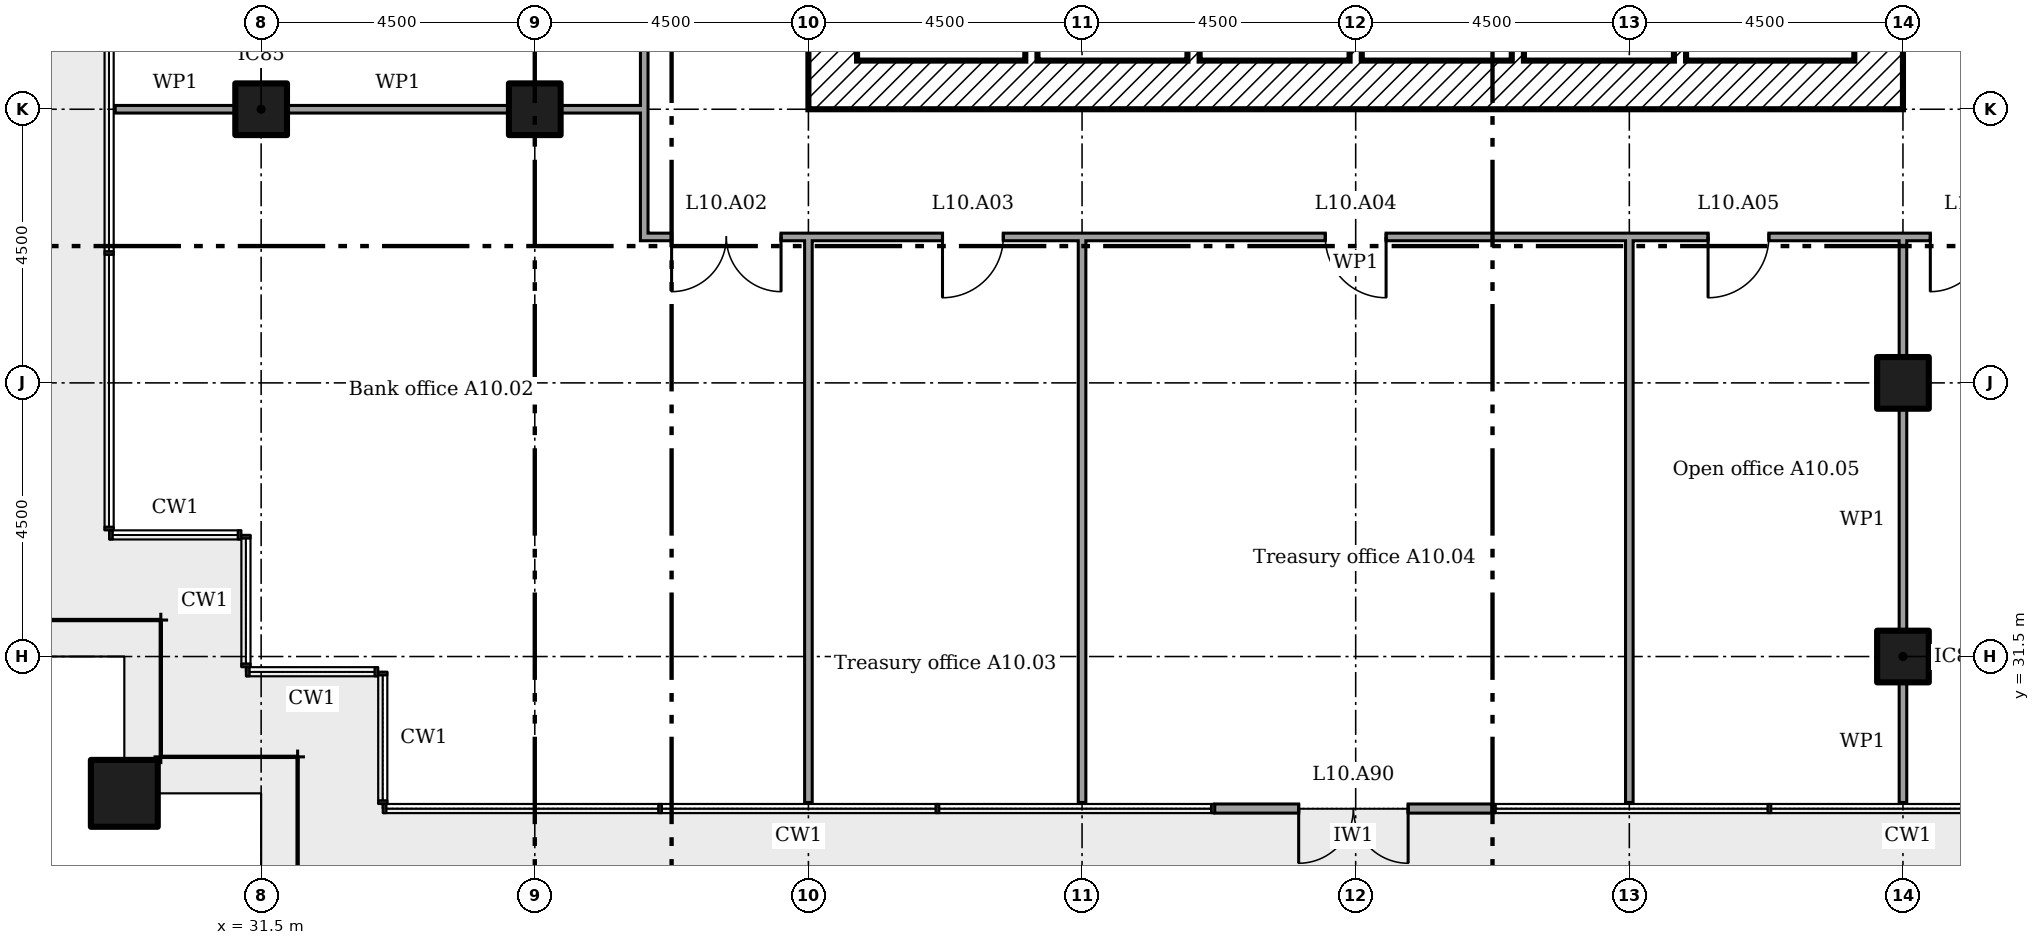
"""IFC4 building model, lengths in metres.
Left out: names, types, materials, properties, quantities, classifications, styles, units other than length and angle.
Written with IfcOpenShell. Run it as: python <this file> out.ifc"""

import sys

from ifc_helpers import new_model, si_unit, direction, frame, frame_2d, origin, origin_2d, place, context, subcontext, project, spatial, rectangle, extrude, element, fill, save


model = new_model("IFC4")
c1 = context("Model", 3, precision=1e-05, world=origin(), true_north=direction((0.0, 1.0)))
c2 = subcontext(c1, "Body", "Model", "MODEL_VIEW")
j1 = project(units=[si_unit("LENGTHUNIT", "METRE"), si_unit("PLANEANGLEUNIT", "RADIAN")], contexts=[c1])
p1 = place(None, origin())
s1 = spatial("IfcSite", under=j1, at=p1, CompositionType="ELEMENT")
p2 = place(p1, origin())
s2 = spatial("IfcBuilding", under=s1, at=p2, CompositionType="ELEMENT")
p3 = place(p2, frame((0.0, 0.0, 47.4)))
s3 = spatial("IfcBuildingStorey", under=s2, at=p3, CompositionType="ELEMENT", Elevation=47.4)
p4 = place(p3, frame((29.25, 29.25, 0.0)))
e1 = element("IfcColumn", 1, at=p4, inside=s3, PredefinedType="COLUMN", context=c2, shape_type="SweptSolid", body=[
    extrude(rectangle(XDim=1.1, YDim=1.1, at=origin_2d()), origin(), (0.0, 0.0, 1.0), 3.6),
])
for number, where in (
    (2, (31.5, 40.5, 0.0)),
    (3, (36.0, 40.5, 0.0)),
    (4, (58.5, 31.5, 0.0)),
    (5, (58.5, 36.0, 0.0)),
):
    element("IfcColumn", number, at=place(p3, frame(where)), inside=s3, PredefinedType="COLUMN", context=c2, shape_type="SweptSolid", body=[
        extrude(rectangle(XDim=0.85, YDim=0.85, at=origin_2d()), origin(), (0.0, 0.0, 1.0), 3.6),
    ])
p5 = place(p3, frame((47.182, 29.0, 0.0)))
e6 = element("IfcWall", 6, at=p5, inside=s3, PredefinedType="SOLIDWALL", context=c2, shape_type="SweptSolid", body=[
    extrude(rectangle(XDim=4.561, YDim=0.15, at=frame_2d((2.28, 0.0))), origin(), (0.0, 0.0, 1.0), 3.45),
])
p6 = place(p5, frame((1.38, 0.0, 0.0)))
e7 = element("IfcOpeningElement", 7, at=p6, cuts=e6, PredefinedType="OPENING", context=c2, shape_type="SweptSolid", body=[
    extrude(rectangle(XDim=1.8, YDim=2.4, at=frame_2d((0.9, 1.2))), frame((0.0, 0.085, 0.0), z_axis=(0.0, -1.0, 0.0), x_axis=(1.0, 0.0, 0.0)), (0.0, 0.0, 1.0), 0.17),
])
p7 = place(p3, frame((58.1, 40.5, 0.0), z_axis=(0.0, 0.0, 1.0), x_axis=(0.0, 1.0, 0.0)))
e8 = element("IfcWall", 8, at=p7, inside=s3, PredefinedType="SHEAR", context=c2, shape_type="SweptSolid", body=[
    extrude(rectangle(XDim=18.0, YDim=0.8, at=frame_2d((9.0, 0.0))), origin(), (0.0, 0.0, 1.0), 3.35),
])
p8 = place(p7, frame((13.15, 0.0, 0.0)))
e9 = element("IfcOpeningElement", 9, at=p8, cuts=e8, PredefinedType="OPENING", context=c2, shape_type="SweptSolid", body=[
    extrude(rectangle(XDim=1.2, YDim=2.1, at=frame_2d((0.6, 1.05))), frame((0.0, 0.41, 0.0), z_axis=(0.0, -1.0, 0.0), x_axis=(1.0, 0.0, 0.0)), (0.0, 0.0, 1.0), 0.82),
])
p9 = place(p7, frame((3.9, 0.0, 0.0)))
e10 = element("IfcOpeningElement", 10, at=p9, cuts=e8, PredefinedType="OPENING", context=c2, shape_type="SweptSolid", body=[
    extrude(rectangle(XDim=1.8, YDim=2.1, at=frame_2d((0.9, 1.05))), frame((0.0, 0.41, 0.0), z_axis=(0.0, -1.0, 0.0), x_axis=(1.0, 0.0, 0.0)), (0.0, 0.0, 1.0), 0.82),
])
p10 = place(p7, frame((11.525, 0.0, 0.0)))
e11 = element("IfcOpeningElement", 11, at=p10, cuts=e8, PredefinedType="OPENING", context=c2, shape_type="SweptSolid", body=[
    extrude(rectangle(XDim=1.0, YDim=2.1, at=frame_2d((0.5, 1.05))), frame((0.0, 0.41, 0.0), z_axis=(0.0, -1.0, 0.0), x_axis=(1.0, 0.0, 0.0)), (0.0, 0.0, 1.0), 0.82),
])
p11 = place(p3, frame((41.3, 40.9, 0.0)))
e12 = element("IfcWall", 12, at=p11, inside=s3, PredefinedType="SHEAR", context=c2, shape_type="SweptSolid", body=[
    extrude(rectangle(XDim=16.4, YDim=0.8, at=frame_2d((8.2, 0.0))), origin(), (0.0, 0.0, 1.0), 3.35),
])
p12 = place(p3, frame((40.9, 40.5, 0.0), z_axis=(0.0, 0.0, 1.0), x_axis=(0.0, 1.0, 0.0)))
e13 = element("IfcWall", 13, at=p12, inside=s3, PredefinedType="SHEAR", context=c2, shape_type="SweptSolid", body=[
    extrude(rectangle(XDim=18.0, YDim=0.8, at=frame_2d((9.0, 0.0))), origin(), (0.0, 0.0, 1.0), 3.35),
])
p13 = place(p12, frame((3.65, 0.0, 0.0)))
e14 = element("IfcOpeningElement", 14, at=p13, cuts=e13, PredefinedType="OPENING", context=c2, shape_type="SweptSolid", body=[
    extrude(rectangle(XDim=1.2, YDim=2.1, at=frame_2d((0.6, 1.05))), frame((0.0, 0.41, 0.0), z_axis=(0.0, -1.0, 0.0), x_axis=(1.0, 0.0, 0.0)), (0.0, 0.0, 1.0), 0.82),
])
p14 = place(p12, frame((5.475, 0.0, 0.0)))
e15 = element("IfcOpeningElement", 15, at=p14, cuts=e13, PredefinedType="OPENING", context=c2, shape_type="SweptSolid", body=[
    extrude(rectangle(XDim=1.0, YDim=2.1, at=frame_2d((0.5, 1.05))), frame((0.0, 0.41, 0.0), z_axis=(0.0, -1.0, 0.0), x_axis=(1.0, 0.0, 0.0)), (0.0, 0.0, 1.0), 0.82),
])
p15 = place(p12, frame((12.3, 0.0, 0.0)))
e16 = element("IfcOpeningElement", 16, at=p15, cuts=e13, PredefinedType="OPENING", context=c2, shape_type="SweptSolid", body=[
    extrude(rectangle(XDim=1.0, YDim=2.1, at=frame_2d((0.5, 1.05))), frame((0.0, 0.41, 0.0), z_axis=(0.0, -1.0, 0.0), x_axis=(1.0, 0.0, 0.0)), (0.0, 0.0, 1.0), 0.82),
])
for number, where, z_axis, x_axis in (
    (17, (44.167, 41.3, 0.0), (0.0, 0.0, 1.0), (0.0, 1.0, 0.0)),
    (18, (46.833, 41.3, 0.0), (0.0, 0.0, 1.0), (0.0, 1.0, 0.0)),
    (19, (49.5, 41.3, 0.0), (0.0, 0.0, 1.0), (0.0, 1.0, 0.0)),
    (20, (52.167, 41.3, 0.0), (0.0, 0.0, 1.0), (0.0, 1.0, 0.0)),
    (21, (54.833, 41.3, 0.0), (0.0, 0.0, 1.0), (0.0, 1.0, 0.0)),
):
    element("IfcWall", number, at=place(p3, frame(where, z_axis=z_axis, x_axis=x_axis)), inside=s3, PredefinedType="SHEAR", context=c2, shape_type="SweptSolid", body=[
        extrude(rectangle(XDim=2.5, YDim=0.2, at=frame_2d((1.25, 0.0))), origin(), (0.0, 0.0, 1.0), 3.35),
    ])
p16 = place(p3, frame((37.738, 38.4, 0.0)))
e22 = element("IfcWall", 22, at=p16, inside=s3, PredefinedType="PARTITIONING", context=c2, shape_type="SweptSolid", body=[
    extrude(rectangle(XDim=23.525, YDim=0.125, at=frame_2d((11.762, 0.0))), origin(), (0.0, 0.0, 1.0), 3.45),
])
p17 = place(p16, frame((0.512, 0.0, 0.0)))
e23 = element("IfcOpeningElement", 23, at=p17, cuts=e22, PredefinedType="OPENING", context=c2, shape_type="SweptSolid", body=[
    extrude(rectangle(XDim=1.8, YDim=2.1, at=frame_2d((0.9, 1.05))), frame((0.0, 0.073, 0.0), z_axis=(0.0, -1.0, 0.0), x_axis=(1.0, 0.0, 0.0)), (0.0, 0.0, 1.0), 0.145),
])
p18 = place(p16, frame((4.968, 0.0, 0.0)))
e24 = element("IfcOpeningElement", 24, at=p18, cuts=e22, PredefinedType="OPENING", context=c2, shape_type="SweptSolid", body=[
    extrude(rectangle(XDim=1.0, YDim=2.1, at=frame_2d((0.5, 1.05))), frame((0.0, 0.073, 0.0), z_axis=(0.0, -1.0, 0.0), x_axis=(1.0, 0.0, 0.0)), (0.0, 0.0, 1.0), 0.145),
])
p19 = place(p16, frame((11.262, 0.0, 0.0)))
e25 = element("IfcOpeningElement", 25, at=p19, cuts=e22, PredefinedType="OPENING", context=c2, shape_type="SweptSolid", body=[
    extrude(rectangle(XDim=1.0, YDim=2.1, at=frame_2d((0.5, 1.05))), frame((0.0, 0.073, 0.0), z_axis=(0.0, -1.0, 0.0), x_axis=(1.0, 0.0, 0.0)), (0.0, 0.0, 1.0), 0.145),
])
p20 = place(p16, frame((17.558, 0.0, 0.0)))
e26 = element("IfcOpeningElement", 26, at=p20, cuts=e22, PredefinedType="OPENING", context=c2, shape_type="SweptSolid", body=[
    extrude(rectangle(XDim=1.0, YDim=2.1, at=frame_2d((0.5, 1.05))), frame((0.0, 0.073, 0.0), z_axis=(0.0, -1.0, 0.0), x_axis=(1.0, 0.0, 0.0)), (0.0, 0.0, 1.0), 0.145),
])
p21 = place(p16, frame((21.212, 0.0, 0.0)))
e27 = element("IfcOpeningElement", 27, at=p21, cuts=e22, PredefinedType="OPENING", context=c2, shape_type="SweptSolid", body=[
    extrude(rectangle(XDim=1.8, YDim=2.1, at=frame_2d((0.9, 1.05))), frame((0.0, 0.073, 0.0), z_axis=(0.0, -1.0, 0.0), x_axis=(1.0, 0.0, 0.0)), (0.0, 0.0, 1.0), 0.145),
])
p22 = place(p3, frame((29.1, 40.5, 0.0)))
e28 = element("IfcWall", 28, at=p22, inside=s3, PredefinedType="PARTITIONING", context=c2, shape_type="SweptSolid", body=[
    extrude(rectangle(XDim=1.975, YDim=0.125, at=frame_2d((0.987, 0.0))), origin(), (0.0, 0.0, 1.0), 2.676),
])
p23 = place(p3, frame((31.925, 40.5, 0.0)))
e29 = element("IfcWall", 29, at=p23, inside=s3, PredefinedType="PARTITIONING", context=c2, shape_type="SweptSolid", body=[
    extrude(rectangle(XDim=3.65, YDim=0.125, at=frame_2d((1.825, 0.0))), origin(), (0.0, 0.0, 1.0), 2.676),
])
p24 = place(p3, frame((36.425, 40.5, 0.0)))
e30 = element("IfcWall", 30, at=p24, inside=s3, PredefinedType="PARTITIONING", context=c2, shape_type="SweptSolid", body=[
    extrude(rectangle(XDim=1.375, YDim=0.125, at=frame_2d((0.688, 0.0))), origin(), (0.0, 0.0, 1.0), 2.676),
])
p25 = place(p3, frame((37.8, 38.462, 0.0), z_axis=(0.0, 0.0, 1.0), x_axis=(0.0, 1.0, 0.0)))
e31 = element("IfcWall", 31, at=p25, inside=s3, PredefinedType="PARTITIONING", context=c2, shape_type="SweptSolid", body=[
    extrude(rectangle(XDim=22.075, YDim=0.125, at=frame_2d((11.038, 0.0))), origin(), (0.0, 0.0, 1.0), 3.45),
])
p26 = place(p25, frame((3.788, 0.0, 0.0)))
e32 = element("IfcOpeningElement", 32, at=p26, cuts=e31, PredefinedType="OPENING", context=c2, shape_type="SweptSolid", body=[
    extrude(rectangle(XDim=1.0, YDim=2.1, at=frame_2d((0.5, 1.05))), frame((0.0, 0.073, 0.0), z_axis=(0.0, -1.0, 0.0), x_axis=(1.0, 0.0, 0.0)), (0.0, 0.0, 1.0), 0.145),
])
p27 = place(p25, frame((17.288, 0.0, 0.0)))
e33 = element("IfcOpeningElement", 33, at=p27, cuts=e31, PredefinedType="OPENING", context=c2, shape_type="SweptSolid", body=[
    extrude(rectangle(XDim=1.0, YDim=2.1, at=frame_2d((0.5, 1.05))), frame((0.0, 0.073, 0.0), z_axis=(0.0, -1.0, 0.0), x_axis=(1.0, 0.0, 0.0)), (0.0, 0.0, 1.0), 0.145),
])
p28 = place(p25, frame((9.295, 0.0, 0.0)))
e34 = element("IfcOpeningElement", 34, at=p28, cuts=e31, PredefinedType="OPENING", context=c2, shape_type="SweptSolid", body=[
    extrude(rectangle(XDim=1.0, YDim=2.1, at=frame_2d((0.5, 1.05))), frame((0.0, 0.073, 0.0), z_axis=(0.0, -1.0, 0.0), x_axis=(1.0, 0.0, 0.0)), (0.0, 0.0, 1.0), 0.145),
])
for number, where, z_axis, x_axis in (
    (35, (40.5, 29.1, 0.0), (0.0, 0.0, 1.0), (0.0, 1.0, 0.0)),
    (36, (45.0, 29.1, 0.0), (0.0, 0.0, 1.0), (0.0, 1.0, 0.0)),
    (37, (54.0, 29.1, 0.0), (0.0, 0.0, 1.0), (0.0, 1.0, 0.0)),
):
    element("IfcWall", number, at=place(p3, frame(where, z_axis=z_axis, x_axis=x_axis)), inside=s3, PredefinedType="PARTITIONING", context=c2, shape_type="SweptSolid", body=[
        extrude(rectangle(XDim=9.3, YDim=0.125, at=frame_2d((4.65, 0.0))), origin(), (0.0, 0.0, 1.0), 2.766),
    ])
p29 = place(p3, frame((58.5, 29.1, 0.0), z_axis=(0.0, 0.0, 1.0), x_axis=(0.0, 1.0, 0.0)))
e38 = element("IfcWall", 38, at=p29, inside=s3, PredefinedType="PARTITIONING", context=c2, shape_type="SweptSolid", body=[
    extrude(rectangle(XDim=1.975, YDim=0.125, at=frame_2d((0.987, 0.0))), origin(), (0.0, 0.0, 1.0), 2.676),
])
p30 = place(p3, frame((58.5, 31.925, 0.0), z_axis=(0.0, 0.0, 1.0), x_axis=(0.0, 1.0, 0.0)))
e39 = element("IfcWall", 39, at=p30, inside=s3, PredefinedType="PARTITIONING", context=c2, shape_type="SweptSolid", body=[
    extrude(rectangle(XDim=3.65, YDim=0.125, at=frame_2d((1.825, 0.0))), origin(), (0.0, 0.0, 1.0), 2.676),
])
p31 = place(p3, frame((58.5, 36.425, 0.0), z_axis=(0.0, 0.0, 1.0), x_axis=(0.0, 1.0, 0.0)))
e40 = element("IfcWall", 40, at=p31, inside=s3, PredefinedType="PARTITIONING", context=c2, shape_type="SweptSolid", body=[
    extrude(rectangle(XDim=1.975, YDim=0.125, at=frame_2d((0.987, 0.0))), origin(), (0.0, 0.0, 1.0), 2.676),
])
p32 = place(p6, frame((1.8, 0.0, 0.0), x_axis=(-1.0, 0.0, 0.0)))
e41 = element("IfcDoor", 41, at=p32, inside=s3, OperationType="DOUBLE_DOOR_DOUBLE_SWING", PredefinedType="NOTDEFINED", context=c2, shape_type="SweptSolid", body=[
    extrude(rectangle(XDim=1.8, YDim=2.4, at=frame_2d((0.9, 1.2))), frame((0.0, 0.025, 0.0), z_axis=(0.0, -1.0, 0.0), x_axis=(1.0, 0.0, 0.0)), (0.0, 0.0, 1.0), 0.05),
])
fill(e7, e41)
p33 = place(p17, frame((1.8, 0.0, 0.0), x_axis=(-1.0, 0.0, 0.0)))
e42 = element("IfcDoor", 42, at=p33, inside=s3, OperationType="DOUBLE_DOOR_SINGLE_SWING", PredefinedType="DOOR", context=c2, shape_type="SweptSolid", body=[
    extrude(rectangle(XDim=1.8, YDim=2.1, at=frame_2d((0.9, 1.05))), frame((0.0, 0.025, 0.0), z_axis=(0.0, -1.0, 0.0), x_axis=(1.0, 0.0, 0.0)), (0.0, 0.0, 1.0), 0.05),
])
fill(e23, e42)
p34 = place(p18, frame((1.0, 0.0, 0.0), x_axis=(-1.0, 0.0, 0.0)))
e43 = element("IfcDoor", 43, at=p34, inside=s3, OperationType="SINGLE_SWING_LEFT", PredefinedType="DOOR", context=c2, shape_type="SweptSolid", body=[
    extrude(rectangle(XDim=1.0, YDim=2.1, at=frame_2d((0.5, 1.05))), frame((0.0, 0.025, 0.0), z_axis=(0.0, -1.0, 0.0), x_axis=(1.0, 0.0, 0.0)), (0.0, 0.0, 1.0), 0.05),
])
fill(e24, e43)
p35 = place(p19, frame((1.0, 0.0, 0.0), x_axis=(-1.0, 0.0, 0.0)))
e44 = element("IfcDoor", 44, at=p35, inside=s3, OperationType="SINGLE_SWING_RIGHT", PredefinedType="DOOR", context=c2, shape_type="SweptSolid", body=[
    extrude(rectangle(XDim=1.0, YDim=2.1, at=frame_2d((0.5, 1.05))), frame((0.0, 0.025, 0.0), z_axis=(0.0, -1.0, 0.0), x_axis=(1.0, 0.0, 0.0)), (0.0, 0.0, 1.0), 0.05),
])
fill(e25, e44)
p36 = place(p20, frame((1.0, 0.0, 0.0), x_axis=(-1.0, 0.0, 0.0)))
e45 = element("IfcDoor", 45, at=p36, inside=s3, OperationType="SINGLE_SWING_LEFT", PredefinedType="DOOR", context=c2, shape_type="SweptSolid", body=[
    extrude(rectangle(XDim=1.0, YDim=2.1, at=frame_2d((0.5, 1.05))), frame((0.0, 0.025, 0.0), z_axis=(0.0, -1.0, 0.0), x_axis=(1.0, 0.0, 0.0)), (0.0, 0.0, 1.0), 0.05),
])
fill(e26, e45)
p37 = place(p21, frame((1.8, 0.0, 0.0), x_axis=(-1.0, 0.0, 0.0)))
e46 = element("IfcDoor", 46, at=p37, inside=s3, OperationType="DOUBLE_DOOR_SINGLE_SWING", PredefinedType="DOOR", context=c2, shape_type="SweptSolid", body=[
    extrude(rectangle(XDim=1.8, YDim=2.1, at=frame_2d((0.9, 1.05))), frame((0.0, 0.025, 0.0), z_axis=(0.0, -1.0, 0.0), x_axis=(1.0, 0.0, 0.0)), (0.0, 0.0, 1.0), 0.05),
])
fill(e27, e46)
save(model, sys.argv[1])
